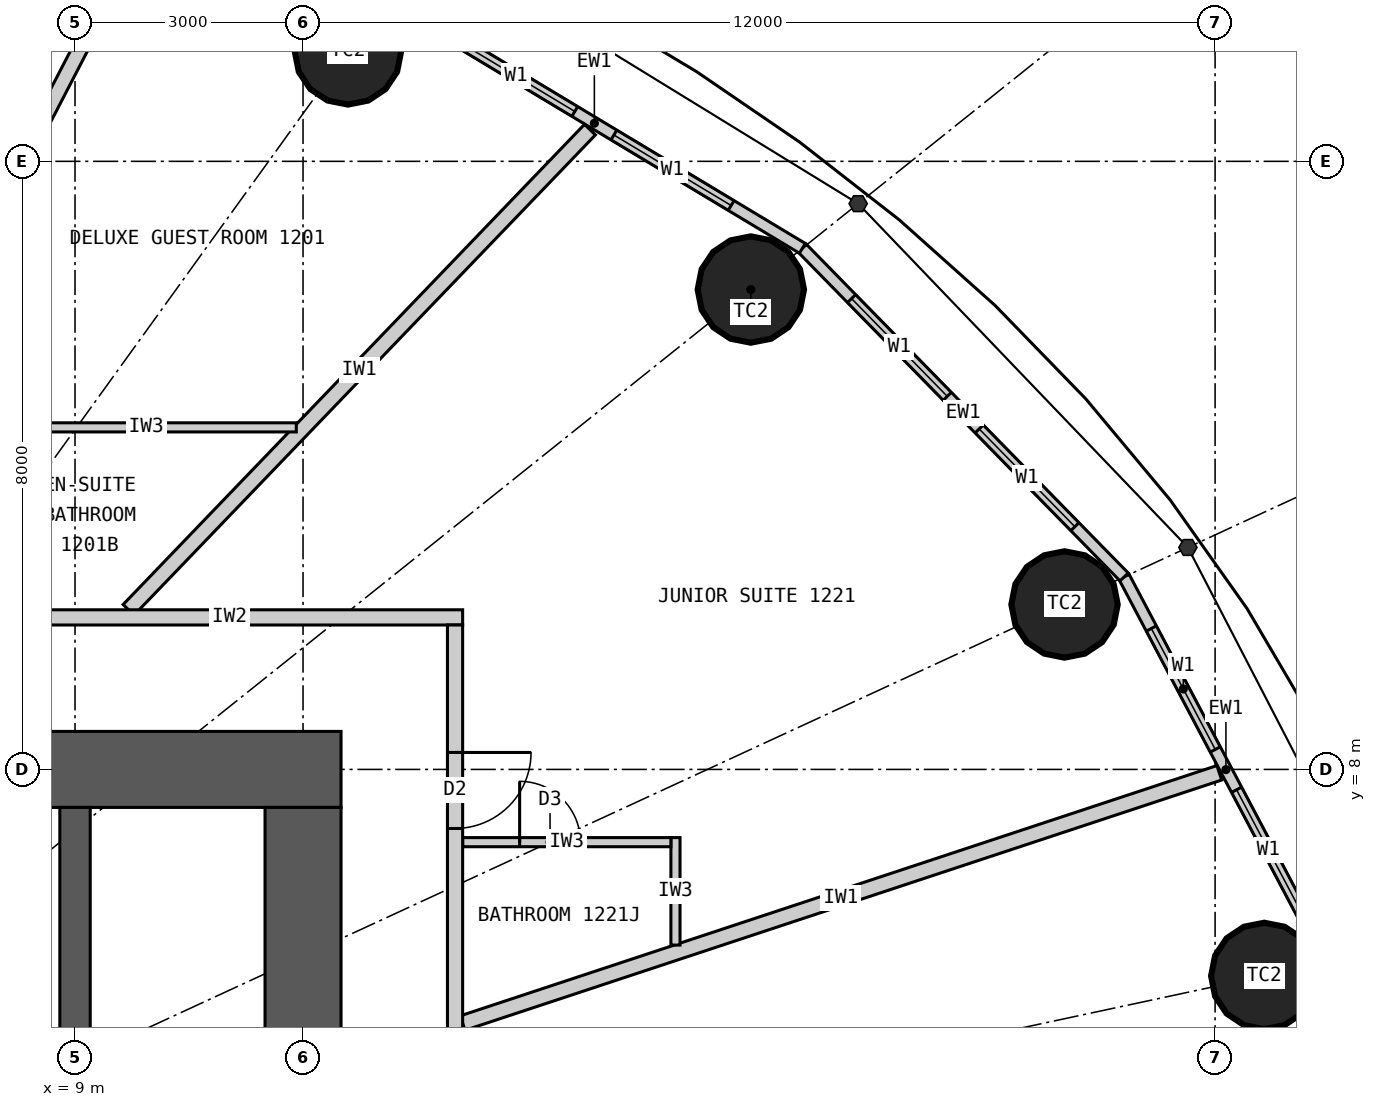
"""IFC4 building model, lengths in metres.
Left out: names, types, materials, properties, quantities, classifications, styles, units other than length and angle.
Written with IfcOpenShell. Run it as: python <this file> out.ifc"""

import sys

from ifc_helpers import new_model, si_unit, direction, frame, frame_2d, origin, origin_2d, place, context, subcontext, project, spatial, rectangle, circle, extrude, element, fill, save


model = new_model("IFC4")
c1 = context("Model", 3, precision=1e-05, world=origin(), true_north=direction((0.0, 1.0)))
c2 = subcontext(c1, "Body", "Model", "MODEL_VIEW")
j1 = project(units=[si_unit("LENGTHUNIT", "METRE"), si_unit("PLANEANGLEUNIT", "RADIAN")], contexts=[c1])
p1 = place(None, origin())
s1 = spatial("IfcSite", under=j1, at=p1, CompositionType="ELEMENT")
p2 = place(p1, origin())
s2 = spatial("IfcBuilding", under=s1, at=p2, CompositionType="ELEMENT")
p3 = place(p2, frame((0.0, 0.0, 54.0)))
s3 = spatial("IfcBuildingStorey", under=s2, at=p3, CompositionType="ELEMENT", Elevation=54.0)
for number, where, z_axis, x_axis in (
    (1, (24.647, 5.283, 0.0), (0.0, 0.0, 1.0), (1.0, 0.0, 0.0)),
    (2, (22.019, 10.17, 0.0), (0.0, 0.0, 1.0), (1.0, 0.0, 0.0)),
    (3, (17.892, 14.313, 0.0), (0.0, 0.0, 1.0), (1.0, 0.0, 0.0)),
    (4, (12.591, 17.447, 0.0), (0.0, 0.0, 1.0), (1.0, 0.0, 0.0)),
):
    element("IfcColumn", number, at=place(p3, frame(where, z_axis=z_axis, x_axis=x_axis)), inside=s3, PredefinedType="COLUMN", context=c2, shape_type="SweptSolid", body=[
        extrude(circle(Radius=0.7, at=origin_2d()), origin(), (0.0, 0.0, 1.0), 3.3),
    ])
p4 = place(p3, frame((-12.5, 8.0, 0.0), z_axis=(0.0, 0.0, 1.0), x_axis=(1.0, 0.0, 0.0)))
e5 = element("IfcWall", 5, at=p4, inside=s3, PredefinedType="SHEAR", context=c2, shape_type="SweptSolid", body=[
    extrude(rectangle(XDim=25.0, YDim=1.0, at=frame_2d((12.5, 0.0))), origin(), (0.0, 0.0, 1.0), 3.3),
])
p5 = place(p4, frame((11.2, 0.0, 0.0)))
e6 = element("IfcOpeningElement", 6, at=p5, cuts=e5, PredefinedType="OPENING", context=c2, shape_type="SweptSolid", body=[
    extrude(rectangle(XDim=1.2, YDim=2.2, at=frame_2d((0.6, 1.1))), frame((0.0, 0.51, 0.0), z_axis=(0.0, -1.0, 0.0), x_axis=(1.0, 0.0, 0.0)), (0.0, 0.0, 1.0), 1.02),
])
p6 = place(p4, frame((18.8, 0.0, 0.0)))
e7 = element("IfcOpeningElement", 7, at=p6, cuts=e5, PredefinedType="OPENING", context=c2, shape_type="SweptSolid", body=[
    extrude(rectangle(XDim=0.9, YDim=2.2, at=frame_2d((0.45, 1.1))), frame((0.0, 0.51, 0.0), z_axis=(0.0, -1.0, 0.0), x_axis=(1.0, 0.0, 0.0)), (0.0, 0.0, 1.0), 1.02),
])
p7 = place(p3, frame((12.0, -7.5, 0.0), z_axis=(0.0, 0.0, 1.0), x_axis=(0.0, 1.0, 0.0)))
e8 = element("IfcWall", 8, at=p7, inside=s3, PredefinedType="SHEAR", context=c2, shape_type="SweptSolid", body=[
    extrude(rectangle(XDim=15.0, YDim=1.0, at=frame_2d((7.5, 0.0))), origin(), (0.0, 0.0, 1.0), 3.3),
])
p8 = place(p7, frame((6.6, 0.0, 0.0)))
e9 = element("IfcOpeningElement", 9, at=p8, cuts=e8, PredefinedType="OPENING", context=c2, shape_type="SweptSolid", body=[
    extrude(rectangle(XDim=1.8, YDim=2.2, at=frame_2d((0.9, 1.1))), frame((0.0, 0.51, 0.0), z_axis=(0.0, -1.0, 0.0), x_axis=(1.0, 0.0, 0.0)), (0.0, 0.0, 1.0), 1.02),
])
p9 = place(p3, frame((9.0, 4.5, 0.0), z_axis=(0.0, 0.0, 1.0), x_axis=(0.0, 1.0, 0.0)))
e10 = element("IfcWall", 10, at=p9, inside=s3, PredefinedType="SHEAR", context=c2, shape_type="SweptSolid", body=[
    extrude(rectangle(XDim=3.0, YDim=0.4, at=frame_2d((1.5, 0.0))), origin(), (0.0, 0.0, 1.0), 3.3),
])
p10 = place(p3, frame((25.482, 5.462, 0.0), z_axis=(0.0, 0.0, 1.0), x_axis=(-0.467296867008, 0.884100468321, 0.0)))
e11 = element("IfcWall", 11, at=p10, inside=s3, PredefinedType="ELEMENTEDWALL", context=c2, shape_type="SweptSolid", body=[
    extrude(rectangle(XDim=5.734, YDim=0.15, at=frame_2d((2.867, 0.0))), origin(), (0.0, 0.0, 1.0), 3.12),
])
p11 = place(p10, frame((0.767, 0.0, 0.9)))
e12 = element("IfcOpeningElement", 12, at=p11, cuts=e11, PredefinedType="OPENING", context=c2, shape_type="SweptSolid", body=[
    extrude(rectangle(XDim=1.8, YDim=1.9, at=frame_2d((0.9, 0.95))), frame((0.0, 0.085, 0.0), z_axis=(0.0, -1.0, 0.0), x_axis=(1.0, 0.0, 0.0)), (0.0, 0.0, 1.0), 0.17),
])
p12 = place(p10, frame((3.167, 0.0, 0.9)))
e13 = element("IfcOpeningElement", 13, at=p12, cuts=e11, PredefinedType="OPENING", context=c2, shape_type="SweptSolid", body=[
    extrude(rectangle(XDim=1.8, YDim=1.9, at=frame_2d((0.9, 0.95))), frame((0.0, 0.085, 0.0), z_axis=(0.0, -1.0, 0.0), x_axis=(1.0, 0.0, 0.0)), (0.0, 0.0, 1.0), 0.17),
])
p13 = place(p3, frame((22.803, 10.532, 0.0), z_axis=(0.0, 0.0, 1.0), x_axis=(-0.699602905915, 0.714531856557, 0.0)))
e14 = element("IfcWall", 14, at=p13, inside=s3, PredefinedType="ELEMENTEDWALL", context=c2, shape_type="SweptSolid", body=[
    extrude(rectangle(XDim=6.051, YDim=0.15, at=frame_2d((3.025, 0.0))), origin(), (0.0, 0.0, 1.0), 3.12),
])
p14 = place(p13, frame((0.926, 0.0, 0.9)))
e15 = element("IfcOpeningElement", 15, at=p14, cuts=e14, PredefinedType="OPENING", context=c2, shape_type="SweptSolid", body=[
    extrude(rectangle(XDim=1.8, YDim=1.9, at=frame_2d((0.9, 0.95))), frame((0.0, 0.085, 0.0), z_axis=(0.0, -1.0, 0.0), x_axis=(1.0, 0.0, 0.0)), (0.0, 0.0, 1.0), 0.17),
])
p15 = place(p13, frame((3.325, 0.0, 0.9)))
e16 = element("IfcOpeningElement", 16, at=p15, cuts=e14, PredefinedType="OPENING", context=c2, shape_type="SweptSolid", body=[
    extrude(rectangle(XDim=1.8, YDim=1.9, at=frame_2d((0.9, 0.95))), frame((0.0, 0.085, 0.0), z_axis=(0.0, -1.0, 0.0), x_axis=(1.0, 0.0, 0.0)), (0.0, 0.0, 1.0), 0.17),
])
p16 = place(p3, frame((18.57, 14.856, 0.0), z_axis=(0.0, 0.0, 1.0), x_axis=(-0.856983180864, 0.515344377787, 0.0)))
e17 = element("IfcWall", 17, at=p16, inside=s3, PredefinedType="ELEMENTEDWALL", context=c2, shape_type="SweptSolid", body=[
    extrude(rectangle(XDim=6.386, YDim=0.15, at=frame_2d((3.193, 0.0))), origin(), (0.0, 0.0, 1.0), 3.12),
])
p17 = place(p16, frame((1.093, 0.0, 0.9)))
e18 = element("IfcOpeningElement", 18, at=p17, cuts=e17, PredefinedType="OPENING", context=c2, shape_type="SweptSolid", body=[
    extrude(rectangle(XDim=1.8, YDim=1.9, at=frame_2d((0.9, 0.95))), frame((0.0, 0.085, 0.0), z_axis=(0.0, -1.0, 0.0), x_axis=(1.0, 0.0, 0.0)), (0.0, 0.0, 1.0), 0.17),
])
p18 = place(p16, frame((3.493, 0.0, 0.9)))
e19 = element("IfcOpeningElement", 19, at=p18, cuts=e17, PredefinedType="OPENING", context=c2, shape_type="SweptSolid", body=[
    extrude(rectangle(XDim=1.8, YDim=1.9, at=frame_2d((0.9, 0.95))), frame((0.0, 0.085, 0.0), z_axis=(0.0, -1.0, 0.0), x_axis=(1.0, 0.0, 0.0)), (0.0, 0.0, 1.0), 0.17),
])
p19 = place(p3, frame((14.1, 4.663, 0.0), z_axis=(0.0, 0.0, 1.0), x_axis=(0.949432655039, 0.31397075269, 0.0)))
e20 = element("IfcWall", 20, at=p19, inside=s3, PredefinedType="PARTITIONING", context=c2, shape_type="SweptSolid", body=[
    extrude(rectangle(XDim=10.486, YDim=0.2, at=frame_2d((5.243, 0.0))), origin(), (0.0, 0.0, 1.0), 3.12),
])
p20 = place(p3, frame((9.705, 10.1, 0.0), z_axis=(0.0, 0.0, 1.0), x_axis=(0.692879226267, 0.721053658064, 0.0)))
e21 = element("IfcWall", 21, at=p20, inside=s3, PredefinedType="PARTITIONING", context=c2, shape_type="SweptSolid", body=[
    extrude(rectangle(XDim=8.761, YDim=0.2, at=frame_2d((4.38, 0.0))), origin(), (0.0, 0.0, 1.0), 3.12),
])
p21 = place(p3, frame((5.239, 10.1, 0.0), z_axis=(0.0, 0.0, 1.0), x_axis=(0.460422783389, 0.887699758103, 0.0)))
e22 = element("IfcWall", 22, at=p21, inside=s3, PredefinedType="PARTITIONING", context=c2, shape_type="SweptSolid", body=[
    extrude(rectangle(XDim=10.12, YDim=0.2, at=frame_2d((5.06, 0.0))), origin(), (0.0, 0.0, 1.0), 3.12),
])
p22 = place(p3, frame((11.911, 12.5, 0.0), z_axis=(0.0, 0.0, 1.0), x_axis=(-1.0, 0.0, 0.0)))
e23 = element("IfcWall", 23, at=p22, inside=s3, PredefinedType="PARTITIONING", context=c2, shape_type="SweptSolid", body=[
    extrude(rectangle(XDim=3.946, YDim=0.12, at=frame_2d((1.973, 0.0))), origin(), (0.0, 0.0, 1.0), 3.12),
])
p23 = place(p3, frame((16.9, 5.689, 0.0), z_axis=(0.0, 0.0, 1.0), x_axis=(0.0, 1.0, 0.0)))
e24 = element("IfcWall", 24, at=p23, inside=s3, PredefinedType="PARTITIONING", context=c2, shape_type="SweptSolid", body=[
    extrude(rectangle(XDim=1.414, YDim=0.12, at=frame_2d((0.707, 0.0))), origin(), (0.0, 0.0, 1.0), 3.12),
])
p24 = place(p3, frame((14.1, 7.043, 0.0), z_axis=(0.0, 0.0, 1.0), x_axis=(1.0, 0.0, 0.0)))
e25 = element("IfcWall", 25, at=p24, inside=s3, PredefinedType="PARTITIONING", context=c2, shape_type="SweptSolid", body=[
    extrude(rectangle(XDim=2.74, YDim=0.12, at=frame_2d((1.37, 0.0))), origin(), (0.0, 0.0, 1.0), 3.12),
])
p25 = place(p24, frame((0.75, 0.0, 0.0)))
e26 = element("IfcOpeningElement", 26, at=p25, cuts=e25, PredefinedType="OPENING", context=c2, shape_type="SweptSolid", body=[
    extrude(rectangle(XDim=0.8, YDim=2.1, at=frame_2d((0.4, 1.05))), frame((0.0, 0.07, 0.0), z_axis=(0.0, -1.0, 0.0), x_axis=(1.0, 0.0, 0.0)), (0.0, 0.0, 1.0), 0.14),
])
p26 = place(p3, frame((7.965, 10.0, 0.0), z_axis=(0.0, 0.0, 1.0), x_axis=(1.0, 0.0, 0.0)))
e27 = element("IfcWall", 27, at=p26, inside=s3, PredefinedType="PARTITIONING", context=c2, shape_type="SweptSolid", body=[
    extrude(rectangle(XDim=6.135, YDim=0.2, at=frame_2d((3.067, 0.0))), origin(), (0.0, 0.0, 1.0), 3.12),
])
p27 = place(p3, frame((14.0, -5.459, 0.0), z_axis=(0.0, 0.0, 1.0), x_axis=(0.0, 1.0, 0.0)))
e28 = element("IfcWall", 28, at=p27, inside=s3, PredefinedType="PARTITIONING", context=c2, shape_type="SweptSolid", body=[
    extrude(rectangle(XDim=15.359, YDim=0.2, at=frame_2d((7.679, 0.0))), origin(), (0.0, 0.0, 1.0), 3.12),
])
p28 = place(p27, frame((2.656, 0.0, 0.0)))
e29 = element("IfcOpeningElement", 29, at=p28, cuts=e28, PredefinedType="OPENING", context=c2, shape_type="SweptSolid", body=[
    extrude(rectangle(XDim=1.0, YDim=2.2, at=frame_2d((0.5, 1.1))), frame((0.0, 0.11, 0.0), z_axis=(0.0, -1.0, 0.0), x_axis=(1.0, 0.0, 0.0)), (0.0, 0.0, 1.0), 0.22),
])
p29 = place(p27, frame((6.537, 0.0, 0.0)))
e30 = element("IfcOpeningElement", 30, at=p29, cuts=e28, PredefinedType="OPENING", context=c2, shape_type="SweptSolid", body=[
    extrude(rectangle(XDim=1.0, YDim=2.2, at=frame_2d((0.5, 1.1))), frame((0.0, 0.11, 0.0), z_axis=(0.0, -1.0, 0.0), x_axis=(1.0, 0.0, 0.0)), (0.0, 0.0, 1.0), 0.22),
])
p30 = place(p27, frame((12.682, 0.0, 0.0)))
e31 = element("IfcOpeningElement", 31, at=p30, cuts=e28, PredefinedType="OPENING", context=c2, shape_type="SweptSolid", body=[
    extrude(rectangle(XDim=1.0, YDim=2.2, at=frame_2d((0.5, 1.1))), frame((0.0, 0.11, 0.0), z_axis=(0.0, -1.0, 0.0), x_axis=(1.0, 0.0, 0.0)), (0.0, 0.0, 1.0), 0.22),
])
p31 = place(p11, origin())
e32 = element("IfcWindow", 32, at=p31, inside=s3, PartitioningType="SINGLE_PANEL", PredefinedType="WINDOW", context=c2, shape_type="SweptSolid", body=[
    extrude(rectangle(XDim=1.8, YDim=1.9, at=frame_2d((0.9, 0.95))), frame((0.0, 0.03, 0.0), z_axis=(0.0, -1.0, 0.0), x_axis=(1.0, 0.0, 0.0)), (0.0, 0.0, 1.0), 0.06),
])
fill(e12, e32)
p32 = place(p12, origin())
e33 = element("IfcWindow", 33, at=p32, inside=s3, PartitioningType="SINGLE_PANEL", PredefinedType="WINDOW", context=c2, shape_type="SweptSolid", body=[
    extrude(rectangle(XDim=1.8, YDim=1.9, at=frame_2d((0.9, 0.95))), frame((0.0, 0.03, 0.0), z_axis=(0.0, -1.0, 0.0), x_axis=(1.0, 0.0, 0.0)), (0.0, 0.0, 1.0), 0.06),
])
fill(e13, e33)
p33 = place(p14, origin())
e34 = element("IfcWindow", 34, at=p33, inside=s3, PartitioningType="SINGLE_PANEL", PredefinedType="WINDOW", context=c2, shape_type="SweptSolid", body=[
    extrude(rectangle(XDim=1.8, YDim=1.9, at=frame_2d((0.9, 0.95))), frame((0.0, 0.03, 0.0), z_axis=(0.0, -1.0, 0.0), x_axis=(1.0, 0.0, 0.0)), (0.0, 0.0, 1.0), 0.06),
])
fill(e15, e34)
p34 = place(p15, origin())
e35 = element("IfcWindow", 35, at=p34, inside=s3, PartitioningType="SINGLE_PANEL", PredefinedType="WINDOW", context=c2, shape_type="SweptSolid", body=[
    extrude(rectangle(XDim=1.8, YDim=1.9, at=frame_2d((0.9, 0.95))), frame((0.0, 0.03, 0.0), z_axis=(0.0, -1.0, 0.0), x_axis=(1.0, 0.0, 0.0)), (0.0, 0.0, 1.0), 0.06),
])
fill(e16, e35)
p35 = place(p17, origin())
e36 = element("IfcWindow", 36, at=p35, inside=s3, PartitioningType="SINGLE_PANEL", PredefinedType="WINDOW", context=c2, shape_type="SweptSolid", body=[
    extrude(rectangle(XDim=1.8, YDim=1.9, at=frame_2d((0.9, 0.95))), frame((0.0, 0.03, 0.0), z_axis=(0.0, -1.0, 0.0), x_axis=(1.0, 0.0, 0.0)), (0.0, 0.0, 1.0), 0.06),
])
fill(e18, e36)
p36 = place(p18, origin())
e37 = element("IfcWindow", 37, at=p36, inside=s3, PartitioningType="SINGLE_PANEL", PredefinedType="WINDOW", context=c2, shape_type="SweptSolid", body=[
    extrude(rectangle(XDim=1.8, YDim=1.9, at=frame_2d((0.9, 0.95))), frame((0.0, 0.03, 0.0), z_axis=(0.0, -1.0, 0.0), x_axis=(1.0, 0.0, 0.0)), (0.0, 0.0, 1.0), 0.06),
])
fill(e19, e37)
p37 = place(p25, origin())
e38 = element("IfcDoor", 38, at=p37, inside=s3, OperationType="SINGLE_SWING_LEFT", PredefinedType="DOOR", context=c2, shape_type="SweptSolid", body=[
    extrude(rectangle(XDim=0.8, YDim=2.1, at=frame_2d((0.4, 1.05))), frame((0.0, 0.025, 0.0), z_axis=(0.0, -1.0, 0.0), x_axis=(1.0, 0.0, 0.0)), (0.0, 0.0, 1.0), 0.05),
])
fill(e26, e38)
p38 = place(p30, origin())
e39 = element("IfcDoor", 39, at=p38, inside=s3, OperationType="SINGLE_SWING_RIGHT", PredefinedType="DOOR", context=c2, shape_type="SweptSolid", body=[
    extrude(rectangle(XDim=1.0, YDim=2.2, at=frame_2d((0.5, 1.1))), frame((0.0, 0.025, 0.0), z_axis=(0.0, -1.0, 0.0), x_axis=(1.0, 0.0, 0.0)), (0.0, 0.0, 1.0), 0.05),
])
fill(e31, e39)
save(model, sys.argv[1])
